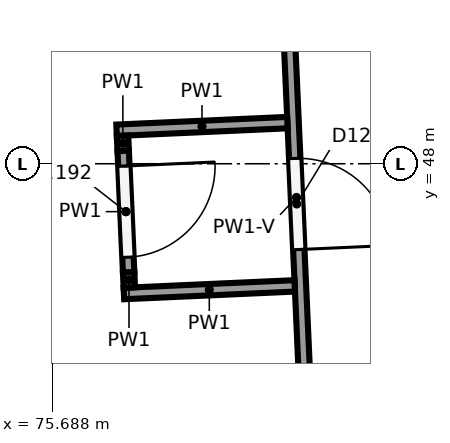
"""IFC4 building model, lengths in metres.
Left out: names, types, materials, properties, quantities, classifications, styles, units other than length and angle.
Written with IfcOpenShell. Run it as: python <this file> out.ifc"""

import sys

from ifc_helpers import new_model, si_unit, direction, frame, frame_2d, origin, place, context, subcontext, project, spatial, rectangle, extrude, element, fill, save


model = new_model("IFC4")
c1 = context("Model", 3, precision=1e-05, world=origin(), true_north=direction((0.0, 1.0)))
c2 = subcontext(c1, "Body", "Model", "MODEL_VIEW")
j1 = project(units=[si_unit("LENGTHUNIT", "METRE"), si_unit("PLANEANGLEUNIT", "RADIAN")], contexts=[c1])
p1 = place(None, origin())
s1 = spatial("IfcSite", under=j1, at=p1, CompositionType="ELEMENT")
p2 = place(p1, origin())
s2 = spatial("IfcBuilding", under=s1, at=p2, CompositionType="ELEMENT")
p3 = place(p2, frame((0.0, 0.0, 12.0)))
s3 = spatial("IfcBuildingStorey", under=s2, at=p3, CompositionType="ELEMENT", Elevation=12.0)
p4 = place(p3, frame((78.691, 52.266, 0.0), z_axis=(0.0, 0.0, 1.0), x_axis=(0.044749816806, -0.998998225172, 0.0)))
e1 = element("IfcWall", 1, at=p4, inside=s3, PredefinedType="PARTITIONING", context=c2, shape_type="SweptSolid", body=[
    extrude(rectangle(XDim=9.427, YDim=0.15, at=frame_2d((4.714, 0.0))), origin(), (0.0, 0.0, 1.0), 3.962),
])
p5 = place(p4, frame((4.2, 0.0, 0.0)))
e2 = element("IfcOpeningElement", 2, at=p5, cuts=e1, PredefinedType="OPENING", context=c2, shape_type="SweptSolid", body=[
    extrude(rectangle(XDim=1.2, YDim=2.1, at=frame_2d((0.6, 1.05))), frame((0.0, 0.085, 0.0), z_axis=(0.0, -1.0, 0.0), x_axis=(1.0, 0.0, 0.0)), (0.0, 0.0, 1.0), 0.17),
])
for number, where, z_axis, x_axis in (
    (3, (78.783, 48.541, 0.0), (0.0, 0.0, 1.0), (-0.999, -0.045, 0.0)),
    (4, (78.879, 46.393, 0.0), (0.0, 0.0, 1.0), (-0.999, -0.045, 0.0)),
):
    element("IfcWall", number, at=place(p3, frame(where, z_axis=z_axis, x_axis=x_axis)), inside=s3, PredefinedType="PARTITIONING", context=c2, shape_type="SweptSolid", body=[
        extrude(rectangle(XDim=2.25, YDim=0.15, at=frame_2d((1.125, 0.0))), origin(), (0.0, 0.0, 1.0), 5.65),
    ])
p6 = place(p3, frame((76.614, 48.369, 0.0), z_axis=(0.0, 0.0, 1.0), x_axis=(0.04518607304, -0.99897858776, 0.0)))
e5 = element("IfcWall", 5, at=p6, inside=s3, PredefinedType="PARTITIONING", context=c2, shape_type="SweptSolid", body=[
    extrude(rectangle(XDim=0.2, YDim=0.15, at=frame_2d((0.1, 0.0))), origin(), (0.0, 0.0, 1.0), 5.65),
])
p7 = place(p3, frame((76.623, 48.169, 0.0), z_axis=(0.0, 0.0, 1.0), x_axis=(0.044708572026, -0.999000071866, 0.0)))
e6 = element("IfcWall", 6, at=p7, inside=s3, PredefinedType="PARTITIONING", context=c2, shape_type="SweptSolid", body=[
    extrude(rectangle(XDim=1.6, YDim=0.15, at=frame_2d((0.8, 0.0))), origin(), (0.0, 0.0, 1.0), 5.65),
])
p8 = place(p7, frame((0.2, 0.0, 0.0)))
e7 = element("IfcOpeningElement", 7, at=p8, cuts=e6, PredefinedType="OPENING", context=c2, shape_type="SweptSolid", body=[
    extrude(rectangle(XDim=1.2, YDim=2.1, at=frame_2d((0.6, 1.05))), frame((0.0, 0.085, 0.0), z_axis=(0.0, -1.0, 0.0), x_axis=(1.0, 0.0, 0.0)), (0.0, 0.0, 1.0), 0.17),
])
p9 = place(p3, frame((76.694, 46.571, 0.0), z_axis=(0.0, 0.0, 1.0), x_axis=(0.043913640913, -0.999035330778, 0.0)))
e8 = element("IfcWall", 8, at=p9, inside=s3, PredefinedType="PARTITIONING", context=c2, shape_type="SweptSolid", body=[
    extrude(rectangle(XDim=0.2, YDim=0.15, at=frame_2d((0.1, 0.0))), origin(), (0.0, 0.0, 1.0), 5.65),
])
p10 = place(p5, origin())
e9 = element("IfcDoor", 9, at=p10, inside=s3, OperationType="SINGLE_SWING_RIGHT", PredefinedType="DOOR", context=c2, shape_type="SweptSolid", body=[
    extrude(rectangle(XDim=1.2, YDim=2.1, at=frame_2d((0.6, 1.05))), frame((0.0, 0.025, 0.0), z_axis=(0.0, -1.0, 0.0), x_axis=(1.0, 0.0, 0.0)), (0.0, 0.0, 1.0), 0.05),
])
fill(e2, e9)
p11 = place(p8, origin())
e10 = element("IfcDoor", 10, at=p11, inside=s3, OperationType="SINGLE_SWING_LEFT", PredefinedType="DOOR", context=c2, shape_type="SweptSolid", body=[
    extrude(rectangle(XDim=1.2, YDim=2.1, at=frame_2d((0.6, 1.05))), frame((0.0, 0.025, 0.0), z_axis=(0.0, -1.0, 0.0), x_axis=(1.0, 0.0, 0.0)), (0.0, 0.0, 1.0), 0.05),
])
fill(e7, e10)
save(model, sys.argv[1])
